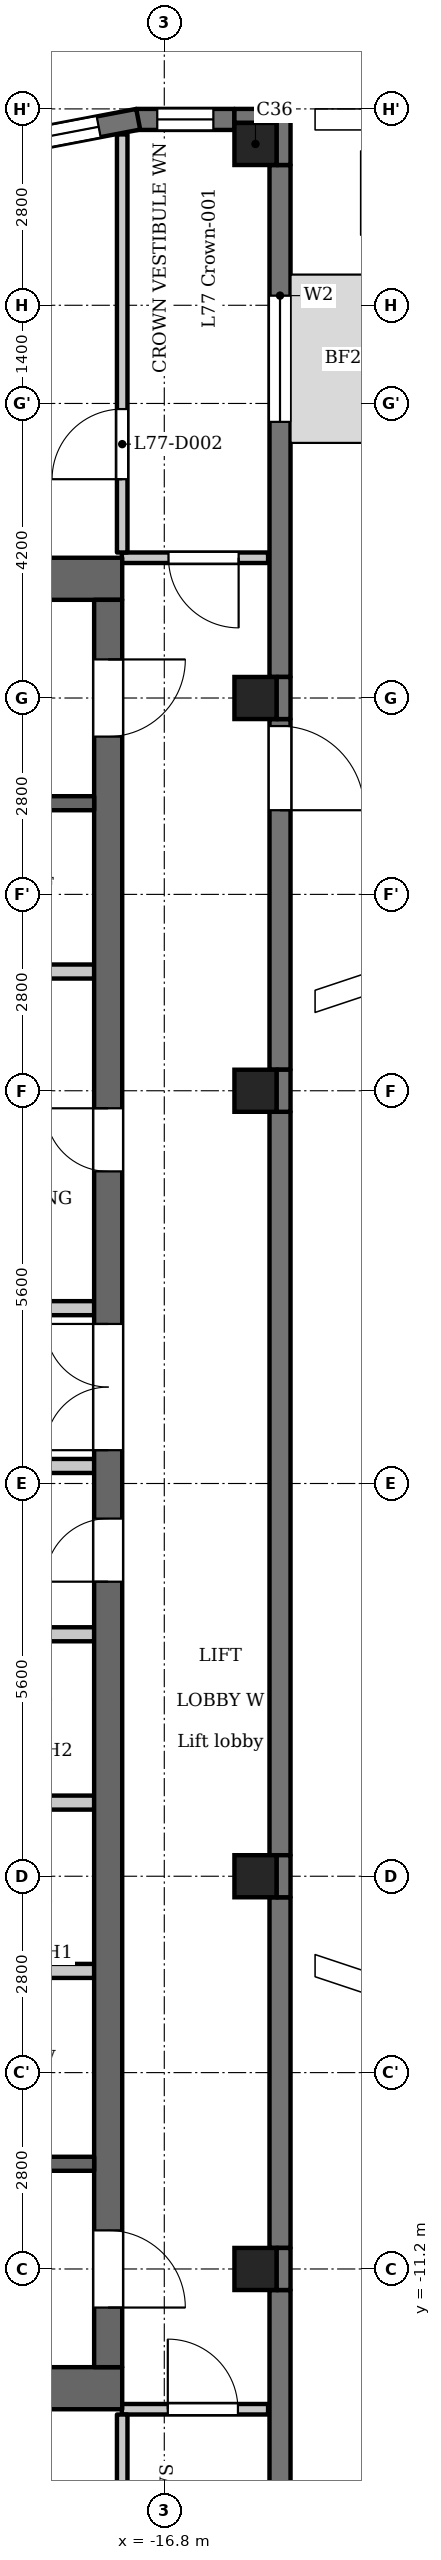
"""IFC4 building model, lengths in metres.
Left out: names, types, materials, properties, quantities, classifications, styles, units other than length and angle.
Written with IfcOpenShell. Run it as: python <this file> out.ifc"""

import sys

from ifc_helpers import new_model, si_unit, direction, frame, frame_2d, origin, origin_2d, place, context, subcontext, project, spatial, polyline, rectangle, outline, extrude, element, fill, save


model = new_model("IFC4")
c1 = context("Model", 3, precision=1e-05, world=origin(), true_north=direction((0.0, 1.0)))
c2 = subcontext(c1, "Body", "Model", "MODEL_VIEW")
j1 = project(units=[si_unit("LENGTHUNIT", "METRE"), si_unit("PLANEANGLEUNIT", "RADIAN")], contexts=[c1])
p1 = place(None, origin())
s1 = spatial("IfcSite", under=j1, at=p1, CompositionType="ELEMENT")
p2 = place(p1, origin())
s2 = spatial("IfcBuilding", under=s1, at=p2, CompositionType="ELEMENT")
p3 = place(p2, frame((0.0, 0.0, 299.9)))
s3 = spatial("IfcBuildingStorey", under=s2, at=p3, CompositionType="ELEMENT", Elevation=299.9)
for number, where, z_axis, x_axis in (
    (1, (-15.5, -11.2, 0.0), (0.0, 0.0, 1.0), (1.0, 0.0, 0.0)),
    (2, (-15.5, -5.6, 0.0), (0.0, 0.0, 1.0), (1.0, 0.0, 0.0)),
    (3, (-15.5, 5.6, 0.0), (0.0, 0.0, 1.0), (1.0, 0.0, 0.0)),
    (4, (-15.5, 11.2, 0.0), (0.0, 0.0, 1.0), (1.0, 0.0, 0.0)),
    (5, (-15.5, 19.1, 0.0), (0.0, 0.0, 1.0), (1.0, 0.0, 0.0)),
):
    element("IfcColumn", number, at=place(p3, frame(where, z_axis=z_axis, x_axis=x_axis)), inside=s3, PredefinedType="COLUMN", context=c2, shape_type="SweptSolid", body=[
        extrude(rectangle(XDim=0.6, YDim=0.6, at=origin_2d()), origin(), (0.0, 0.0, 1.0), 3.5),
    ])
p4 = place(p3, frame((-15.15, -18.8, 0.0), z_axis=(0.0, 0.0, 1.0), x_axis=(0.0, 1.0, 0.0)))
e6 = element("IfcWall", 6, at=p4, inside=s3, PredefinedType="SOLIDWALL", context=c2, shape_type="SweptSolid", body=[
    extrude(rectangle(XDim=7.3, YDim=0.3, at=frame_2d((3.65, 0.0))), origin(), (0.0, 0.0, 1.0), 3.2),
])
p5 = place(p4, frame((1.863, 0.0, 0.9)))
e7 = element("IfcOpeningElement", 7, at=p5, cuts=e6, PredefinedType="OPENING", context=c2, shape_type="SweptSolid", body=[
    extrude(rectangle(XDim=1.8, YDim=1.25, at=frame_2d((0.9, 0.625))), frame((0.0, 0.16, 0.0), z_axis=(0.0, -1.0, 0.0), x_axis=(1.0, 0.0, 0.0)), (0.0, 0.0, 1.0), 0.32),
])
p6 = place(p3, frame((-15.15, -10.9, 0.0), z_axis=(0.0, 0.0, 1.0), x_axis=(0.0, 1.0, 0.0)))
e8 = element("IfcWall", 8, at=p6, inside=s3, PredefinedType="SOLIDWALL", context=c2, shape_type="SweptSolid", body=[
    extrude(rectangle(XDim=5.0, YDim=0.3, at=frame_2d((2.5, 0.0))), origin(), (0.0, 0.0, 1.0), 3.2),
])
p7 = place(p3, frame((-15.15, -5.3, 0.0), z_axis=(0.0, 0.0, 1.0), x_axis=(0.0, 1.0, 0.0)))
e9 = element("IfcWall", 9, at=p7, inside=s3, PredefinedType="SOLIDWALL", context=c2, shape_type="SweptSolid", body=[
    extrude(rectangle(XDim=10.6, YDim=0.3, at=frame_2d((5.3, 0.0))), origin(), (0.0, 0.0, 1.0), 3.2),
])
p8 = place(p3, frame((-15.15, 5.9, 0.0), z_axis=(0.0, 0.0, 1.0), x_axis=(0.0, 1.0, 0.0)))
e10 = element("IfcWall", 10, at=p8, inside=s3, PredefinedType="SOLIDWALL", context=c2, shape_type="SweptSolid", body=[
    extrude(rectangle(XDim=5.0, YDim=0.3, at=frame_2d((2.5, 0.0))), origin(), (0.0, 0.0, 1.0), 3.2),
])
p9 = place(p8, frame((3.7, 0.0, 0.0)))
e11 = element("IfcOpeningElement", 11, at=p9, cuts=e10, PredefinedType="OPENING", context=c2, shape_type="SweptSolid", body=[
    extrude(rectangle(XDim=1.2, YDim=2.1, at=frame_2d((0.6, 1.05))), frame((0.0, 0.16, 0.0), z_axis=(0.0, -1.0, 0.0), x_axis=(1.0, 0.0, 0.0)), (0.0, 0.0, 1.0), 0.32),
])
p10 = place(p3, frame((-15.15, 11.5, 0.0), z_axis=(0.0, 0.0, 1.0), x_axis=(0.0, 1.0, 0.0)))
e12 = element("IfcWall", 12, at=p10, inside=s3, PredefinedType="SOLIDWALL", context=c2, shape_type="SweptSolid", body=[
    extrude(rectangle(XDim=7.3, YDim=0.3, at=frame_2d((3.65, 0.0))), origin(), (0.0, 0.0, 1.0), 3.2),
])
p11 = place(p10, frame((3.637, 0.0, 0.9)))
e13 = element("IfcOpeningElement", 13, at=p11, cuts=e12, PredefinedType="OPENING", context=c2, shape_type="SweptSolid", body=[
    extrude(rectangle(XDim=1.8, YDim=1.25, at=frame_2d((0.9, 0.625))), frame((0.0, 0.16, 0.0), z_axis=(0.0, -1.0, 0.0), x_axis=(1.0, 0.0, 0.0)), (0.0, 0.0, 1.0), 0.32),
])
p12 = place(p3, frame((-15.8, 19.45, 0.0), z_axis=(0.0, 0.0, 1.0), x_axis=(-1.0, 0.0, 0.0)))
e14 = element("IfcWall", 14, at=p12, inside=s3, PredefinedType="SOLIDWALL", context=c2, shape_type="SweptSolid", body=[
    extrude(rectangle(XDim=1.4, YDim=0.3, at=frame_2d((0.7, 0.0))), origin(), (0.0, 0.0, 1.0), 3.2),
])
p13 = place(p12, frame((0.3, 0.0, 0.6)))
e15 = element("IfcOpeningElement", 15, at=p13, cuts=e14, PredefinedType="OPENING", context=c2, shape_type="SweptSolid", body=[
    extrude(rectangle(XDim=0.8, YDim=1.55, at=frame_2d((0.4, 0.775))), frame((0.0, 0.16, 0.0), z_axis=(0.0, -1.0, 0.0), x_axis=(1.0, 0.0, 0.0)), (0.0, 0.0, 1.0), 0.32),
])
p14 = place(p3, frame((-17.172, 19.453, 0.0), z_axis=(0.0, 0.0, 1.0), x_axis=(-0.982286967073, -0.187382801553, 0.0)))
e16 = element("IfcWall", 16, at=p14, inside=s3, PredefinedType="SOLIDWALL", context=c2, shape_type="SweptSolid", body=[
    extrude(rectangle(XDim=1.948, YDim=0.3, at=frame_2d((0.974, 0.0))), origin(), (0.0, 0.0, 1.0), 2.6),
])
p15 = place(p14, frame((0.574, 0.0, 0.6)))
e17 = element("IfcOpeningElement", 17, at=p15, cuts=e16, PredefinedType="OPENING", context=c2, shape_type="SweptSolid", body=[
    extrude(rectangle(XDim=0.8, YDim=1.55, at=frame_2d((0.4, 0.775))), frame((0.0, 0.16, 0.0), z_axis=(0.0, -1.0, 0.0), x_axis=(1.0, 0.0, 0.0)), (0.0, 0.0, 1.0), 0.32),
])
p16 = place(p3, origin())
e18 = element("IfcWall", 18, at=p16, inside=s3, PredefinedType="PARAPET", context=c2, shape_type="SweptSolid", body=[
    extrude(outline(polyline([(-13.8, 7.0), (-7.0, 7.0), (-7.0, 7.3), (-13.849, 7.3), (-14.65, 7.033), (-14.65, 6.717), (-13.8, 7.0)])), origin(), (0.0, 0.0, 1.0), 1.1),
])
e19 = element("IfcWall", 19, at=p16, inside=s3, PredefinedType="PARAPET", context=c2, shape_type="SweptSolid", body=[
    extrude(outline(polyline([(-7.0, 19.6), (-14.65, 19.6), (-14.65, 19.3), (-7.0, 19.3), (-7.0, 19.6)])), origin(), (0.0, 0.0, 1.0), 1.1),
])
e20 = element("IfcWall", 20, at=p16, inside=s3, PredefinedType="PARAPET", context=c2, shape_type="SweptSolid", body=[
    extrude(outline(polyline([(-13.8, -7.0), (-14.65, -6.717), (-14.65, -7.033), (-13.849, -7.3), (13.849, -7.3), (14.65, -7.033), (14.65, -6.717), (13.8, -7.0), (-13.8, -7.0)])), origin(), (0.0, 0.0, 1.0), 1.1),
])
for number, where, z_axis, x_axis in (
    (21, (-17.4, 12.9, 0.0), (0.0, 0.0, 1.0), (-1.0, 0.0, 0.0)),
    (22, (-17.4, -12.9, 0.0), (0.0, 0.0, 1.0), (-1.0, 0.0, 0.0)),
):
    element("IfcWall", number, at=place(p3, frame(where, z_axis=z_axis, x_axis=x_axis)), inside=s3, PredefinedType="SHEAR", context=c2, shape_type="SweptSolid", body=[
        extrude(rectangle(XDim=7.6, YDim=0.6, at=frame_2d((3.8, 0.0))), origin(), (0.0, 0.0, 1.0), 3.2),
    ])
p17 = place(p3, frame((-17.6, -12.6, 0.0), z_axis=(0.0, 0.0, 1.0), x_axis=(0.0, 1.0, 0.0)))
e23 = element("IfcWall", 23, at=p17, inside=s3, PredefinedType="SHEAR", context=c2, shape_type="SweptSolid", body=[
    extrude(rectangle(XDim=25.2, YDim=0.4, at=frame_2d((12.6, 0.0))), origin(), (0.0, 0.0, 1.0), 3.2),
])
p18 = place(p17, frame((11.2, 0.0, 0.0)))
e24 = element("IfcOpeningElement", 24, at=p18, cuts=e23, PredefinedType="OPENING", context=c2, shape_type="SweptSolid", body=[
    extrude(rectangle(XDim=0.9, YDim=2.1, at=frame_2d((0.45, 1.05))), frame((0.0, 0.21, 0.0), z_axis=(0.0, -1.0, 0.0), x_axis=(1.0, 0.0, 0.0)), (0.0, 0.0, 1.0), 0.42),
])
p19 = place(p17, frame((17.05, 0.0, 0.0)))
e25 = element("IfcOpeningElement", 25, at=p19, cuts=e23, PredefinedType="OPENING", context=c2, shape_type="SweptSolid", body=[
    extrude(rectangle(XDim=0.9, YDim=2.1, at=frame_2d((0.45, 1.05))), frame((0.0, 0.21, 0.0), z_axis=(0.0, -1.0, 0.0), x_axis=(1.0, 0.0, 0.0)), (0.0, 0.0, 1.0), 0.42),
])
p20 = place(p17, frame((23.25, 0.0, 0.0)))
e26 = element("IfcOpeningElement", 26, at=p20, cuts=e23, PredefinedType="OPENING", context=c2, shape_type="SweptSolid", body=[
    extrude(rectangle(XDim=1.1, YDim=2.1, at=frame_2d((0.55, 1.05))), frame((0.0, 0.21, 0.0), z_axis=(0.0, -1.0, 0.0), x_axis=(1.0, 0.0, 0.0)), (0.0, 0.0, 1.0), 0.42),
])
p21 = place(p17, frame((0.85, 0.0, 0.0)))
e27 = element("IfcOpeningElement", 27, at=p21, cuts=e23, PredefinedType="OPENING", context=c2, shape_type="SweptSolid", body=[
    extrude(rectangle(XDim=1.1, YDim=2.1, at=frame_2d((0.55, 1.05))), frame((0.0, 0.21, 0.0), z_axis=(0.0, -1.0, 0.0), x_axis=(1.0, 0.0, 0.0)), (0.0, 0.0, 1.0), 0.42),
])
p22 = place(p17, frame((13.075, 0.0, 0.0)))
e28 = element("IfcOpeningElement", 28, at=p22, cuts=e23, PredefinedType="OPENING", context=c2, shape_type="SweptSolid", body=[
    extrude(rectangle(XDim=1.8, YDim=2.1, at=frame_2d((0.9, 1.05))), frame((0.0, 0.21, 0.0), z_axis=(0.0, -1.0, 0.0), x_axis=(1.0, 0.0, 0.0)), (0.0, 0.0, 1.0), 0.42),
])
p23 = place(p3, frame((-17.8, -9.7, 0.0), z_axis=(0.0, 0.0, 1.0), x_axis=(-1.0, 0.0, 0.0)))
e29 = element("IfcWall", 29, at=p23, inside=s3, PredefinedType="SHEAR", context=c2, shape_type="SweptSolid", body=[
    extrude(rectangle(XDim=5.8, YDim=0.2, at=frame_2d((2.9, 0.0))), origin(), (0.0, 0.0, 1.0), 3.2),
])
p24 = place(p23, frame((0.85, 0.0, 0.0)))
e30 = element("IfcOpeningElement", 30, at=p24, cuts=e29, PredefinedType="OPENING", context=c2, shape_type="SweptSolid", body=[
    extrude(rectangle(XDim=1.1, YDim=2.1, at=frame_2d((0.55, 1.05))), frame((0.0, 0.11, 0.0), z_axis=(0.0, -1.0, 0.0), x_axis=(1.0, 0.0, 0.0)), (0.0, 0.0, 1.0), 0.22),
])
p25 = place(p23, frame((3.75, 0.0, 0.0)))
e31 = element("IfcOpeningElement", 31, at=p25, cuts=e29, PredefinedType="OPENING", context=c2, shape_type="SweptSolid", body=[
    extrude(rectangle(XDim=1.1, YDim=2.1, at=frame_2d((0.55, 1.05))), frame((0.0, 0.11, 0.0), z_axis=(0.0, -1.0, 0.0), x_axis=(1.0, 0.0, 0.0)), (0.0, 0.0, 1.0), 0.22),
])
for number, where, z_axis, x_axis in (
    (32, (-17.8, -6.95, 0.0), (0.0, 0.0, 1.0), (-1.0, 0.0, 0.0)),
    (33, (-17.8, -4.55, 0.0), (0.0, 0.0, 1.0), (-1.0, 0.0, 0.0)),
    (34, (-17.8, -2.15, 0.0), (0.0, 0.0, 1.0), (-1.0, 0.0, 0.0)),
):
    element("IfcWall", number, at=place(p3, frame(where, z_axis=z_axis, x_axis=x_axis)), inside=s3, PredefinedType="PARTITIONING", context=c2, shape_type="SweptSolid", body=[
        extrude(rectangle(XDim=2.8, YDim=0.2, at=frame_2d((1.4, 0.0))), origin(), (0.0, 0.0, 1.0), 3.2),
    ])
for number, where, z_axis, x_axis in (
    (35, (-17.8, 0.25, 0.0), (0.0, 0.0, 1.0), (-1.0, 0.0, 0.0)),
    (36, (-17.8, 2.5, 0.0), (0.0, 0.0, 1.0), (-1.0, 0.0, 0.0)),
):
    element("IfcWall", number, at=place(p3, frame(where, z_axis=z_axis, x_axis=x_axis)), inside=s3, PredefinedType="PARTITIONING", context=c2, shape_type="SweptSolid", body=[
        extrude(rectangle(XDim=3.0, YDim=0.2, at=frame_2d((1.5, 0.0))), origin(), (0.0, 0.0, 1.0), 3.2),
    ])
p26 = place(p3, frame((-17.8, 7.3, 0.0), z_axis=(0.0, 0.0, 1.0), x_axis=(-1.0, 0.0, 0.0)))
e37 = element("IfcWall", 37, at=p26, inside=s3, PredefinedType="PARTITIONING", context=c2, shape_type="SweptSolid", body=[
    extrude(rectangle(XDim=2.8, YDim=0.2, at=frame_2d((1.4, 0.0))), origin(), (0.0, 0.0, 1.0), 3.2),
])
p27 = place(p3, frame((-17.8, 9.7, 0.0), z_axis=(0.0, 0.0, 1.0), x_axis=(-1.0, 0.0, 0.0)))
e38 = element("IfcWall", 38, at=p27, inside=s3, PredefinedType="SHEAR", context=c2, shape_type="SweptSolid", body=[
    extrude(rectangle(XDim=5.8, YDim=0.2, at=frame_2d((2.9, 0.0))), origin(), (0.0, 0.0, 1.0), 3.2),
])
p28 = place(p27, frame((0.85, 0.0, 0.0)))
e39 = element("IfcOpeningElement", 39, at=p28, cuts=e38, PredefinedType="OPENING", context=c2, shape_type="SweptSolid", body=[
    extrude(rectangle(XDim=1.1, YDim=2.1, at=frame_2d((0.55, 1.05))), frame((0.0, 0.11, 0.0), z_axis=(0.0, -1.0, 0.0), x_axis=(1.0, 0.0, 0.0)), (0.0, 0.0, 1.0), 0.22),
])
p29 = place(p27, frame((3.75, 0.0, 0.0)))
e40 = element("IfcOpeningElement", 40, at=p29, cuts=e38, PredefinedType="OPENING", context=c2, shape_type="SweptSolid", body=[
    extrude(rectangle(XDim=1.1, YDim=2.1, at=frame_2d((0.55, 1.05))), frame((0.0, 0.11, 0.0), z_axis=(0.0, -1.0, 0.0), x_axis=(1.0, 0.0, 0.0)), (0.0, 0.0, 1.0), 0.22),
])
p30 = place(p3, frame((-17.405, -13.2, 0.0), z_axis=(0.0, 0.0, 1.0), x_axis=(1.0, 0.0, 0.0)))
e41 = element("IfcWall", 41, at=p30, inside=s3, PredefinedType="PARTITIONING", context=c2, shape_type="SweptSolid", body=[
    extrude(rectangle(XDim=2.085, YDim=0.15, at=frame_2d((1.042, 0.0))), origin(), (0.0, 0.0, 1.0), 3.2),
])
p31 = place(p30, frame((0.655, 0.0, 0.0)))
e42 = element("IfcOpeningElement", 42, at=p31, cuts=e41, PredefinedType="OPENING", context=c2, shape_type="SweptSolid", body=[
    extrude(rectangle(XDim=1.0, YDim=2.1, at=frame_2d((0.5, 1.05))), frame((0.0, 0.085, 0.0), z_axis=(0.0, -1.0, 0.0), x_axis=(1.0, 0.0, 0.0)), (0.0, 0.0, 1.0), 0.17),
])
p32 = place(p3, frame((-17.405, 13.2, 0.0), z_axis=(0.0, 0.0, 1.0), x_axis=(1.0, 0.0, 0.0)))
e43 = element("IfcWall", 43, at=p32, inside=s3, PredefinedType="PARTITIONING", context=c2, shape_type="SweptSolid", body=[
    extrude(rectangle(XDim=2.085, YDim=0.15, at=frame_2d((1.042, 0.0))), origin(), (0.0, 0.0, 1.0), 3.2),
])
p33 = place(p32, frame((0.665, 0.0, 0.0)))
e44 = element("IfcOpeningElement", 44, at=p33, cuts=e43, PredefinedType="OPENING", context=c2, shape_type="SweptSolid", body=[
    extrude(rectangle(XDim=1.0, YDim=2.1, at=frame_2d((0.5, 1.05))), frame((0.0, 0.085, 0.0), z_axis=(0.0, -1.0, 0.0), x_axis=(1.0, 0.0, 0.0)), (0.0, 0.0, 1.0), 0.17),
])
p34 = place(p3, frame((-17.4, -19.236, 0.0), z_axis=(0.0, 0.0, 1.0), x_axis=(0.0, 1.0, 0.0)))
e45 = element("IfcWall", 45, at=p34, inside=s3, PredefinedType="PARTITIONING", context=c2, shape_type="SweptSolid", body=[
    extrude(rectangle(XDim=5.961, YDim=0.15, at=frame_2d((2.981, 0.0))), origin(), (0.0, 0.0, 1.0), 3.2),
])
p35 = place(p34, frame((0.486, 0.0, 0.0)))
e46 = element("IfcOpeningElement", 46, at=p35, cuts=e45, PredefinedType="OPENING", context=c2, shape_type="SweptSolid", body=[
    extrude(rectangle(XDim=0.9, YDim=2.1, at=frame_2d((0.45, 1.05))), frame((0.0, 0.085, 0.0), z_axis=(0.0, -1.0, 0.0), x_axis=(1.0, 0.0, 0.0)), (0.0, 0.0, 1.0), 0.17),
])
p36 = place(p3, frame((-17.4, 13.275, 0.0), z_axis=(0.0, 0.0, 1.0), x_axis=(0.0, 1.0, 0.0)))
e47 = element("IfcWall", 47, at=p36, inside=s3, PredefinedType="PARTITIONING", context=c2, shape_type="SweptSolid", body=[
    extrude(rectangle(XDim=5.961, YDim=0.15, at=frame_2d((2.981, 0.0))), origin(), (0.0, 0.0, 1.0), 3.2),
])
p37 = place(p36, frame((1.045, 0.0, 0.0)))
e48 = element("IfcOpeningElement", 48, at=p37, cuts=e47, PredefinedType="OPENING", context=c2, shape_type="SweptSolid", body=[
    extrude(rectangle(XDim=1.0, YDim=2.1, at=frame_2d((0.5, 1.05))), frame((0.0, 0.085, 0.0), z_axis=(0.0, -1.0, 0.0), x_axis=(1.0, 0.0, 0.0)), (0.0, 0.0, 1.0), 0.17),
])
e49 = element("IfcWall", 49, at=p16, inside=s3, PredefinedType="SOLIDWALL", context=c2, shape_type="SweptSolid", body=[
    extrude(outline(polyline([(-15.0, 18.8), (-15.0, 19.6), (-15.8, 19.6), (-15.8, 19.4), (-15.2, 19.4), (-15.2, 18.8), (-15.0, 18.8)])), origin(), (0.0, 0.0, 1.0), 3.2),
])
e50 = element("IfcWall", 50, at=p16, inside=s3, PredefinedType="SOLIDWALL", context=c2, shape_type="SweptSolid", body=[
    extrude(outline(polyline([(-15.2, 11.5), (-15.2, 10.9), (-15.0, 10.9), (-15.0, 11.5), (-15.2, 11.5)])), origin(), (0.0, 0.0, 1.0), 3.2),
])
e51 = element("IfcWall", 51, at=p16, inside=s3, PredefinedType="SOLIDWALL", context=c2, shape_type="SweptSolid", body=[
    extrude(outline(polyline([(-15.2, 5.3), (-15.0, 5.3), (-15.0, 5.9), (-15.3, 5.9), (-15.2, 5.9), (-15.2, 5.3)])), origin(), (0.0, 0.0, 1.0), 3.2),
])
e52 = element("IfcWall", 52, at=p16, inside=s3, PredefinedType="SOLIDWALL", context=c2, shape_type="SweptSolid", body=[
    extrude(outline(polyline([(-15.3, -5.9), (-15.0, -5.9), (-15.0, -5.3), (-15.3, -5.3), (-15.2, -5.3), (-15.2, -5.9), (-15.3, -5.9)])), origin(), (0.0, 0.0, 1.0), 3.2),
])
e53 = element("IfcWall", 53, at=p16, inside=s3, PredefinedType="SOLIDWALL", context=c2, shape_type="SweptSolid", body=[
    extrude(outline(polyline([(-15.2, -11.5), (-15.0, -11.5), (-15.0, -10.9), (-15.2, -10.9), (-15.2, -11.5)])), origin(), (0.0, 0.0, 1.0), 3.2),
])
p38 = place(p18, origin())
e54 = element("IfcDoor", 54, at=p38, inside=s3, OperationType="SINGLE_SWING_RIGHT", PredefinedType="DOOR", context=c2, shape_type="SweptSolid", body=[
    extrude(rectangle(XDim=0.9, YDim=2.1, at=frame_2d((0.45, 1.05))), frame((0.0, 0.025, 0.0), z_axis=(0.0, -1.0, 0.0), x_axis=(1.0, 0.0, 0.0)), (0.0, 0.0, 1.0), 0.05),
])
fill(e24, e54)
p39 = place(p19, origin())
e55 = element("IfcDoor", 55, at=p39, inside=s3, OperationType="SINGLE_SWING_LEFT", PredefinedType="DOOR", context=c2, shape_type="SweptSolid", body=[
    extrude(rectangle(XDim=0.9, YDim=2.1, at=frame_2d((0.45, 1.05))), frame((0.0, 0.025, 0.0), z_axis=(0.0, -1.0, 0.0), x_axis=(1.0, 0.0, 0.0)), (0.0, 0.0, 1.0), 0.05),
])
fill(e25, e55)
p40 = place(p20, origin())
e56 = element("IfcDoor", 56, at=p40, inside=s3, OperationType="SINGLE_SWING_RIGHT", PredefinedType="DOOR", context=c2, shape_type="SweptSolid", body=[
    extrude(rectangle(XDim=1.1, YDim=2.1, at=frame_2d((0.55, 1.05))), frame((0.0, 0.025, 0.0), z_axis=(0.0, -1.0, 0.0), x_axis=(1.0, 0.0, 0.0)), (0.0, 0.0, 1.0), 0.05),
])
fill(e26, e56)
p41 = place(p21, origin())
e57 = element("IfcDoor", 57, at=p41, inside=s3, OperationType="SINGLE_SWING_LEFT", PredefinedType="DOOR", context=c2, shape_type="SweptSolid", body=[
    extrude(rectangle(XDim=1.1, YDim=2.1, at=frame_2d((0.55, 1.05))), frame((0.0, 0.025, 0.0), z_axis=(0.0, -1.0, 0.0), x_axis=(1.0, 0.0, 0.0)), (0.0, 0.0, 1.0), 0.05),
])
fill(e27, e57)
p42 = place(p22, origin())
e58 = element("IfcDoor", 58, at=p42, inside=s3, OperationType="DOUBLE_DOOR_SINGLE_SWING", PredefinedType="DOOR", context=c2, shape_type="SweptSolid", body=[
    extrude(rectangle(XDim=1.8, YDim=2.1, at=frame_2d((0.9, 1.05))), frame((0.0, 0.025, 0.0), z_axis=(0.0, -1.0, 0.0), x_axis=(1.0, 0.0, 0.0)), (0.0, 0.0, 1.0), 0.05),
])
fill(e28, e58)
p43 = place(p33, origin())
e59 = element("IfcDoor", 59, at=p43, inside=s3, OperationType="SINGLE_SWING_RIGHT", PredefinedType="DOOR", context=c2, shape_type="SweptSolid", body=[
    extrude(rectangle(XDim=1.0, YDim=2.1, at=frame_2d((0.5, 1.05))), frame((0.0, 0.025, 0.0), z_axis=(0.0, -1.0, 0.0), x_axis=(1.0, 0.0, 0.0)), (0.0, 0.0, 1.0), 0.05),
])
fill(e44, e59)
p44 = place(p37, origin())
e60 = element("IfcDoor", 60, at=p44, inside=s3, OperationType="SINGLE_SWING_RIGHT", PredefinedType="DOOR", context=c2, shape_type="SweptSolid", body=[
    extrude(rectangle(XDim=1.0, YDim=2.1, at=frame_2d((0.5, 1.05))), frame((0.0, 0.025, 0.0), z_axis=(0.0, -1.0, 0.0), x_axis=(1.0, 0.0, 0.0)), (0.0, 0.0, 1.0), 0.05),
])
fill(e48, e60)
p45 = place(p31, origin())
e61 = element("IfcDoor", 61, at=p45, inside=s3, OperationType="SINGLE_SWING_RIGHT", PredefinedType="DOOR", context=c2, shape_type="SweptSolid", body=[
    extrude(rectangle(XDim=1.0, YDim=2.1, at=frame_2d((0.5, 1.05))), frame((0.0, 0.025, 0.0), z_axis=(0.0, -1.0, 0.0), x_axis=(1.0, 0.0, 0.0)), (0.0, 0.0, 1.0), 0.05),
])
fill(e42, e61)
p46 = place(p9, origin())
e62 = element("IfcDoor", 62, at=p46, inside=s3, OperationType="SINGLE_SWING_LEFT", PredefinedType="DOOR", context=c2, shape_type="SweptSolid", body=[
    extrude(rectangle(XDim=1.2, YDim=2.1, at=frame_2d((0.6, 1.05))), frame((0.0, 0.025, 0.0), z_axis=(0.0, -1.0, 0.0), x_axis=(1.0, 0.0, 0.0)), (0.0, 0.0, 1.0), 0.05),
])
fill(e11, e62)
p47 = place(p11, origin())
e63 = element("IfcWindow", 63, at=p47, inside=s3, PartitioningType="SINGLE_PANEL", PredefinedType="WINDOW", context=c2, shape_type="SweptSolid", body=[
    extrude(rectangle(XDim=1.8, YDim=1.25, at=frame_2d((0.9, 0.625))), frame((0.0, 0.03, 0.0), z_axis=(0.0, -1.0, 0.0), x_axis=(1.0, 0.0, 0.0)), (0.0, 0.0, 1.0), 0.06),
])
fill(e13, e63)
p48 = place(p13, origin())
e64 = element("IfcWindow", 64, at=p48, inside=s3, PartitioningType="SINGLE_PANEL", PredefinedType="WINDOW", context=c2, shape_type="SweptSolid", body=[
    extrude(rectangle(XDim=0.8, YDim=1.55, at=frame_2d((0.4, 0.775))), frame((0.0, 0.03, 0.0), z_axis=(0.0, -1.0, 0.0), x_axis=(1.0, 0.0, 0.0)), (0.0, 0.0, 1.0), 0.06),
])
fill(e15, e64)
p49 = place(p15, origin())
e65 = element("IfcWindow", 65, at=p49, inside=s3, PartitioningType="SINGLE_PANEL", PredefinedType="WINDOW", context=c2, shape_type="SweptSolid", body=[
    extrude(rectangle(XDim=0.8, YDim=1.55, at=frame_2d((0.4, 0.775))), frame((0.0, 0.03, 0.0), z_axis=(0.0, -1.0, 0.0), x_axis=(1.0, 0.0, 0.0)), (0.0, 0.0, 1.0), 0.06),
])
fill(e17, e65)
save(model, sys.argv[1])
